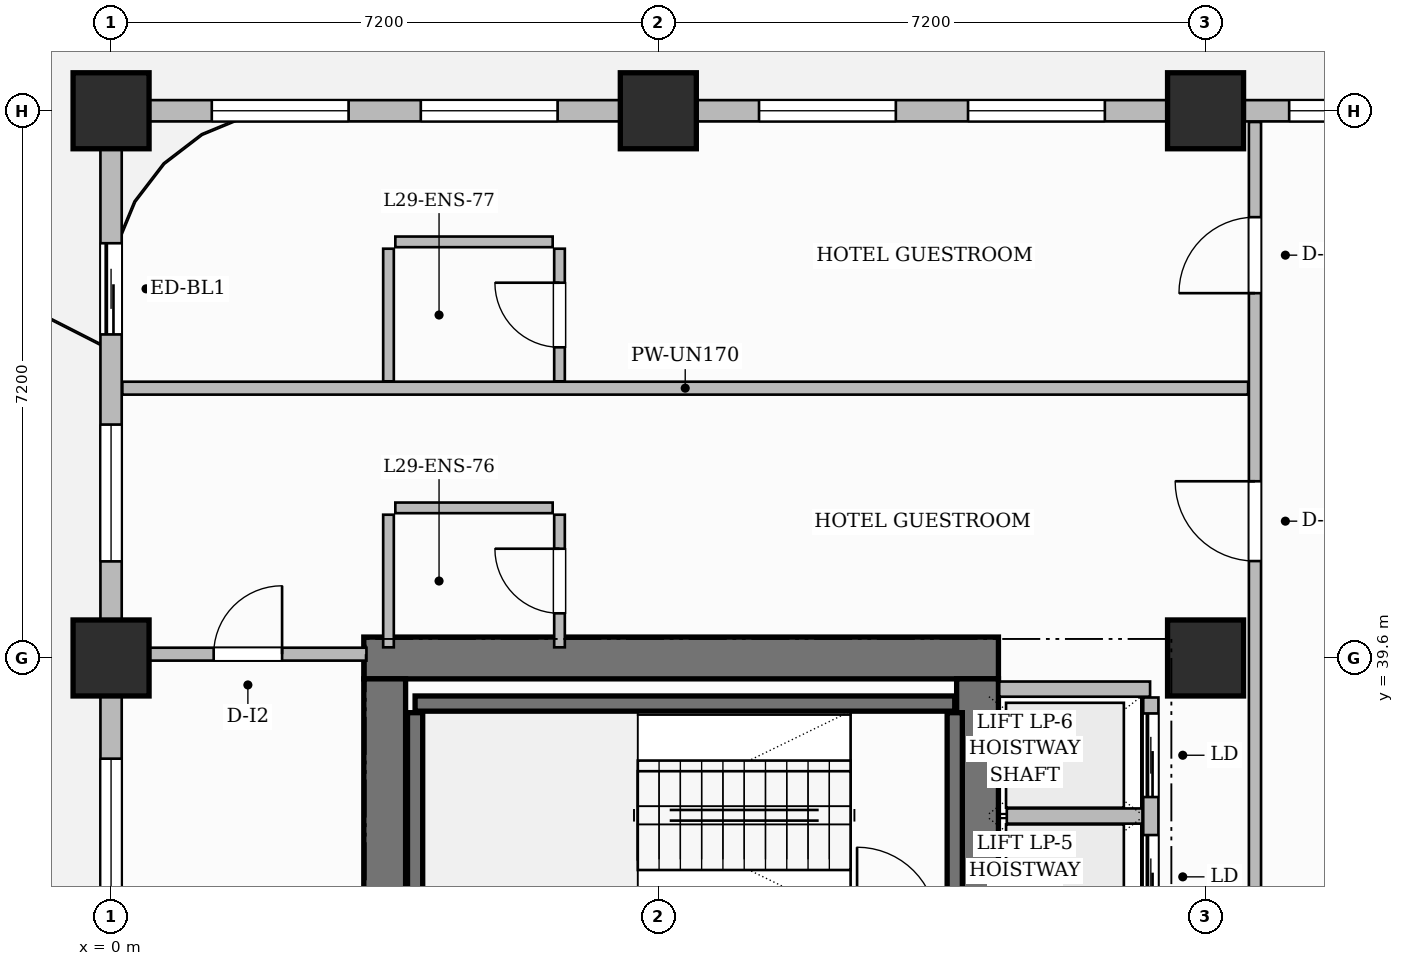
"""IFC4 building model, lengths in metres.
Left out: names, types, materials, properties, quantities, classifications, styles, units other than length and angle.
Written with IfcOpenShell. Run it as: python <this file> out.ifc"""

import sys

from ifc_helpers import new_model, si_unit, direction, frame, frame_2d, origin, origin_2d, place, context, subcontext, project, spatial, rectangle, extrude, source, transform, mapped, element, fill, save


model = new_model("IFC4")
c1 = context("Model", 3, precision=1e-05, world=origin(), true_north=direction((0.0, 1.0)))
c2 = subcontext(c1, "Body", "Model", "MODEL_VIEW")
j1 = project(units=[si_unit("LENGTHUNIT", "METRE"), si_unit("PLANEANGLEUNIT", "RADIAN")], contexts=[c1])
p1 = place(None, origin())
s1 = spatial("IfcSite", under=j1, at=p1, CompositionType="ELEMENT")
p2 = place(p1, origin())
s2 = spatial("IfcBuilding", under=s1, at=p2, CompositionType="ELEMENT")
p3 = place(p2, frame((0.0, 0.0, 119.2)))
s3 = spatial("IfcBuildingStorey", under=s2, at=p3, CompositionType="ELEMENT", Elevation=119.2)
p4 = place(p3, frame((3.325, 39.6, 0.0), z_axis=(0.0, 0.0, 1.0), x_axis=(1.0, 0.0, 0.0)))
e1 = element("IfcWall", 1, at=p4, inside=s3, PredefinedType="SHEAR", context=c2, shape_type="SweptSolid", body=[
    extrude(rectangle(XDim=8.35, YDim=0.55, at=frame_2d((4.175, 0.0))), origin(), (0.0, 0.0, 1.0), 3.7),
])
p5 = place(p3, frame((3.6, 25.475, 0.0), z_axis=(0.0, 0.0, 1.0), x_axis=(0.0, 1.0, 0.0)))
e2 = element("IfcWall", 2, at=p5, inside=s3, PredefinedType="SHEAR", context=c2, shape_type="SweptSolid", body=[
    extrude(rectangle(XDim=13.85, YDim=0.55, at=frame_2d((6.925, 0.0))), origin(), (0.0, 0.0, 1.0), 3.7),
])
p6 = place(p3, frame((11.4, 25.475, 0.0), z_axis=(0.0, 0.0, 1.0), x_axis=(0.0, 1.0, 0.0)))
e3 = element("IfcWall", 3, at=p6, inside=s3, PredefinedType="SHEAR", context=c2, shape_type="SweptSolid", body=[
    extrude(rectangle(XDim=13.85, YDim=0.55, at=frame_2d((6.925, 0.0))), origin(), (0.0, 0.0, 1.0), 3.7),
])
p7 = place(p6, frame((6.495, 0.0, 0.0)))
e4 = element("IfcOpeningElement", 4, at=p7, cuts=e3, PredefinedType="OPENING", context=c2, shape_type="SweptSolid", body=[
    extrude(rectangle(XDim=1.5, YDim=2.2, at=frame_2d((0.75, 1.1))), frame((0.0, 0.285, 0.0), z_axis=(0.0, -1.0, 0.0), x_axis=(1.0, 0.0, 0.0)), (0.0, 0.0, 1.0), 0.57),
])
m1 = source(origin(), c2, "Body", "SweptSolid", [
    extrude(rectangle(XDim=1.0, YDim=1.0, at=origin_2d()), origin(), (0.0, 0.0, 1.0), 3.7),
])
for number, where, z_axis, x_axis in (
    (5, (0.0, 39.6, 0.0), (0.0, 0.0, 1.0), (1.0, 0.0, 0.0)),
    (6, (0.0, 46.8, 0.0), (0.0, 0.0, 1.0), (1.0, 0.0, 0.0)),
    (7, (7.2, 46.8, 0.0), (0.0, 0.0, 1.0), (1.0, 0.0, 0.0)),
    (8, (14.4, 39.6, 0.0), (0.0, 0.0, 1.0), (1.0, 0.0, 0.0)),
    (9, (14.4, 46.8, 0.0), (0.0, 0.0, 1.0), (1.0, 0.0, 0.0)),
):
    element("IfcColumn", number, at=place(p3, frame(where, z_axis=z_axis, x_axis=x_axis)), inside=s3, PredefinedType="COLUMN", context=c2, shape_type="MappedRepresentation", body=[
        mapped(m1, transform((0.0, 0.0, 0.0), scale=1.0)),
    ])
p8 = place(p3, frame((4.0, 39.0, 0.0), z_axis=(0.0, 0.0, 1.0), x_axis=(1.0, 0.0, 0.0)))
e10 = element("IfcWall", 10, at=p8, inside=s3, PredefinedType="SHEAR", context=c2, shape_type="SweptSolid", body=[
    extrude(rectangle(XDim=7.1, YDim=0.2, at=frame_2d((3.55, 0.0))), origin(), (0.0, 0.0, 1.0), 3.7),
])
for number, where, z_axis, x_axis in (
    (11, (4.0, 36.18, 0.0), (0.0, 0.0, 1.0), (0.0, 1.0, 0.0)),
    (12, (11.1, 36.18, 0.0), (0.0, 0.0, 1.0), (0.0, 1.0, 0.0)),
):
    element("IfcWall", number, at=place(p3, frame(where, z_axis=z_axis, x_axis=x_axis)), inside=s3, PredefinedType="SHEAR", context=c2, shape_type="SweptSolid", body=[
        extrude(rectangle(XDim=2.7, YDim=0.2, at=frame_2d((1.35, 0.0))), origin(), (0.0, 0.0, 1.0), 3.7),
    ])
p9 = place(p3, frame((11.685, 39.19, 0.0), z_axis=(0.0, 0.0, 1.0), x_axis=(1.0, 0.0, 0.0)))
e13 = element("IfcWall", 13, at=p9, inside=s3, PredefinedType="PARTITIONING", context=c2, shape_type="SweptSolid", body=[
    extrude(rectangle(XDim=1.985, YDim=0.2, at=frame_2d((0.992, 0.0))), origin(), (0.0, 0.0, 1.0), 3.45),
])
p10 = place(p3, frame((13.68, 34.36, 0.0), z_axis=(0.0, 0.0, 1.0), x_axis=(0.0, 1.0, 0.0)))
e14 = element("IfcWall", 14, at=p10, inside=s3, PredefinedType="PARTITIONING", context=c2, shape_type="SweptSolid", body=[
    extrude(rectangle(XDim=4.72, YDim=0.2, at=frame_2d((2.36, 0.0))), origin(), (0.0, 0.0, 1.0), 3.45),
])
p11 = place(p10, frame((0.21, 0.0, 0.0)))
e15 = element("IfcOpeningElement", 15, at=p11, cuts=e14, PredefinedType="OPENING", context=c2, shape_type="SweptSolid", body=[
    extrude(rectangle(XDim=1.1, YDim=2.2, at=frame_2d((0.55, 1.1))), frame((0.0, 0.11, 0.0), z_axis=(0.0, -1.0, 0.0), x_axis=(1.0, 0.0, 0.0)), (0.0, 0.0, 1.0), 0.22),
])
p12 = place(p10, frame((1.81, 0.0, 0.0)))
e16 = element("IfcOpeningElement", 16, at=p12, cuts=e14, PredefinedType="OPENING", context=c2, shape_type="SweptSolid", body=[
    extrude(rectangle(XDim=1.1, YDim=2.2, at=frame_2d((0.55, 1.1))), frame((0.0, 0.11, 0.0), z_axis=(0.0, -1.0, 0.0), x_axis=(1.0, 0.0, 0.0)), (0.0, 0.0, 1.0), 0.22),
])
p13 = place(p10, frame((3.41, 0.0, 0.0)))
e17 = element("IfcOpeningElement", 17, at=p13, cuts=e14, PredefinedType="OPENING", context=c2, shape_type="SweptSolid", body=[
    extrude(rectangle(XDim=1.1, YDim=2.2, at=frame_2d((0.55, 1.1))), frame((0.0, 0.11, 0.0), z_axis=(0.0, -1.0, 0.0), x_axis=(1.0, 0.0, 0.0)), (0.0, 0.0, 1.0), 0.22),
])
p14 = place(p3, frame((11.785, 37.52, 0.0), z_axis=(0.0, 0.0, 1.0), x_axis=(1.0, 0.0, 0.0)))
e18 = element("IfcWall", 18, at=p14, inside=s3, PredefinedType="PARTITIONING", context=c2, shape_type="SweptSolid", body=[
    extrude(rectangle(XDim=1.785, YDim=0.2, at=frame_2d((0.893, 0.0))), origin(), (0.0, 0.0, 1.0), 3.45),
])
p15 = place(p3, frame((0.24, 39.65, 0.0), z_axis=(0.0, 0.0, 1.0), x_axis=(1.0, 0.0, 0.0)))
e19 = element("IfcWall", 19, at=p15, inside=s3, PredefinedType="PARTITIONING", context=c2, shape_type="SweptSolid", body=[
    extrude(rectangle(XDim=3.12, YDim=0.17, at=frame_2d((1.56, 0.0))), origin(), (0.0, 0.0, 1.0), 3.45),
])
p16 = place(p15, frame((1.11, 0.0, 0.0)))
e20 = element("IfcOpeningElement", 20, at=p16, cuts=e19, PredefinedType="OPENING", context=c2, shape_type="SweptSolid", body=[
    extrude(rectangle(XDim=0.9, YDim=2.15, at=frame_2d((0.45, 1.075))), frame((0.0, 0.095, 0.0), z_axis=(0.0, -1.0, 0.0), x_axis=(1.0, 0.0, 0.0)), (0.0, 0.0, 1.0), 0.19),
])
p17 = place(p3, frame((15.05, 34.34, 0.0), z_axis=(0.0, 0.0, 1.0), x_axis=(0.0, 1.0, 0.0)))
e21 = element("IfcWall", 21, at=p17, inside=s3, PredefinedType="PARTITIONING", context=c2, shape_type="SweptSolid", body=[
    extrude(rectangle(XDim=12.312, YDim=0.16, at=frame_2d((6.156, 0.0))), origin(), (0.0, 0.0, 1.0), 3.45),
])
p18 = place(p17, frame((6.535, 0.0, 0.0)))
e22 = element("IfcOpeningElement", 22, at=p18, cuts=e21, PredefinedType="OPENING", context=c2, shape_type="SweptSolid", body=[
    extrude(rectangle(XDim=1.05, YDim=2.25, at=frame_2d((0.525, 1.125))), frame((0.0, 0.09, 0.0), z_axis=(0.0, -1.0, 0.0), x_axis=(1.0, 0.0, 0.0)), (0.0, 0.0, 1.0), 0.18),
])
p19 = place(p17, frame((10.06, 0.0, 0.0)))
e23 = element("IfcOpeningElement", 23, at=p19, cuts=e21, PredefinedType="OPENING", context=c2, shape_type="SweptSolid", body=[
    extrude(rectangle(XDim=1.0, YDim=2.2, at=frame_2d((0.5, 1.1))), frame((0.0, 0.09, 0.0), z_axis=(0.0, -1.0, 0.0), x_axis=(1.0, 0.0, 0.0)), (0.0, 0.0, 1.0), 0.18),
])
p20 = place(p3, frame((0.148, 43.15, 0.0), z_axis=(0.0, 0.0, 1.0), x_axis=(1.0, 0.0, 0.0)))
e24 = element("IfcWall", 24, at=p20, inside=s3, PredefinedType="PARTITIONING", context=c2, shape_type="SweptSolid", body=[
    extrude(rectangle(XDim=14.812, YDim=0.17, at=frame_2d((7.406, 0.0))), origin(), (0.0, 0.0, 1.0), 3.45),
])
p21 = place(p3, frame((3.65, 39.74, 0.0), z_axis=(0.0, 0.0, 1.0), x_axis=(0.0, 1.0, 0.0)))
e25 = element("IfcWall", 25, at=p21, inside=s3, PredefinedType="PARTITIONING", context=c2, shape_type="SweptSolid", body=[
    extrude(rectangle(XDim=1.745, YDim=0.14, at=frame_2d((0.873, 0.0))), origin(), (0.0, 0.0, 1.0), 3.45),
])
p22 = place(p3, frame((3.74, 41.575, 0.0), z_axis=(0.0, 0.0, 1.0), x_axis=(1.0, 0.0, 0.0)))
e26 = element("IfcWall", 26, at=p22, inside=s3, PredefinedType="PARTITIONING", context=c2, shape_type="SweptSolid", body=[
    extrude(rectangle(XDim=2.07, YDim=0.14, at=frame_2d((1.035, 0.0))), origin(), (0.0, 0.0, 1.0), 2.935),
])
p23 = place(p3, frame((5.9, 39.74, 0.0), z_axis=(0.0, 0.0, 1.0), x_axis=(0.0, 1.0, 0.0)))
e27 = element("IfcWall", 27, at=p23, inside=s3, PredefinedType="PARTITIONING", context=c2, shape_type="SweptSolid", body=[
    extrude(rectangle(XDim=1.745, YDim=0.14, at=frame_2d((0.873, 0.0))), origin(), (0.0, 0.0, 1.0), 3.45),
])
p24 = place(p23, frame((0.448, 0.0, 0.0)))
e28 = element("IfcOpeningElement", 28, at=p24, cuts=e27, PredefinedType="OPENING", context=c2, shape_type="SweptSolid", body=[
    extrude(rectangle(XDim=0.85, YDim=2.1, at=frame_2d((0.425, 1.05))), frame((0.0, 0.08, 0.0), z_axis=(0.0, -1.0, 0.0), x_axis=(1.0, 0.0, 0.0)), (0.0, 0.0, 1.0), 0.16),
])
p25 = place(p3, frame((3.65, 43.24, 0.0), z_axis=(0.0, 0.0, 1.0), x_axis=(0.0, 1.0, 0.0)))
e29 = element("IfcWall", 29, at=p25, inside=s3, PredefinedType="PARTITIONING", context=c2, shape_type="SweptSolid", body=[
    extrude(rectangle(XDim=1.745, YDim=0.14, at=frame_2d((0.873, 0.0))), origin(), (0.0, 0.0, 1.0), 3.45),
])
p26 = place(p3, frame((3.74, 45.075, 0.0), z_axis=(0.0, 0.0, 1.0), x_axis=(1.0, 0.0, 0.0)))
e30 = element("IfcWall", 30, at=p26, inside=s3, PredefinedType="PARTITIONING", context=c2, shape_type="SweptSolid", body=[
    extrude(rectangle(XDim=2.07, YDim=0.14, at=frame_2d((1.035, 0.0))), origin(), (0.0, 0.0, 1.0), 3.45),
])
p27 = place(p3, frame((5.9, 43.24, 0.0), z_axis=(0.0, 0.0, 1.0), x_axis=(0.0, 1.0, 0.0)))
e31 = element("IfcWall", 31, at=p27, inside=s3, PredefinedType="PARTITIONING", context=c2, shape_type="SweptSolid", body=[
    extrude(rectangle(XDim=1.745, YDim=0.14, at=frame_2d((0.873, 0.0))), origin(), (0.0, 0.0, 1.0), 3.45),
])
p28 = place(p27, frame((0.448, 0.0, 0.0)))
e32 = element("IfcOpeningElement", 32, at=p28, cuts=e31, PredefinedType="OPENING", context=c2, shape_type="SweptSolid", body=[
    extrude(rectangle(XDim=0.85, YDim=2.1, at=frame_2d((0.425, 1.05))), frame((0.0, 0.08, 0.0), z_axis=(0.0, -1.0, 0.0), x_axis=(1.0, 0.0, 0.0)), (0.0, 0.0, 1.0), 0.16),
])
p29 = place(p3, frame((0.0, 25.25, 0.0), z_axis=(0.0, 0.0, 1.0), x_axis=(0.0, 1.0, 0.0)))
e33 = element("IfcWall", 33, at=p29, inside=s3, PredefinedType="SOLIDWALL", context=c2, shape_type="SweptSolid", body=[
    extrude(rectangle(XDim=21.5, YDim=0.28, at=frame_2d((10.75, 0.0))), origin(), (0.0, 0.0, 1.0), 2.935),
])
p30 = place(p29, frame((18.607, 0.0, 0.0)))
e34 = element("IfcOpeningElement", 34, at=p30, cuts=e33, PredefinedType="OPENING", context=c2, shape_type="SweptSolid", body=[
    extrude(rectangle(XDim=1.2, YDim=2.2, at=frame_2d((0.6, 1.1))), frame((0.0, 0.15, 0.0), z_axis=(0.0, -1.0, 0.0), x_axis=(1.0, 0.0, 0.0)), (0.0, 0.0, 1.0), 0.3),
])
p31 = place(p29, frame((0.8, 0.0, 0.0)))
e35 = element("IfcOpeningElement", 35, at=p31, cuts=e33, PredefinedType="OPENING", context=c2, shape_type="SweptSolid", body=[
    extrude(rectangle(XDim=1.2, YDim=2.2, at=frame_2d((0.6, 1.1))), frame((0.0, 0.15, 0.0), z_axis=(0.0, -1.0, 0.0), x_axis=(1.0, 0.0, 0.0)), (0.0, 0.0, 1.0), 0.3),
])
p32 = place(p29, frame((3.425, 0.0, 0.8)))
e36 = element("IfcOpeningElement", 36, at=p32, cuts=e33, PredefinedType="OPENING", context=c2, shape_type="SweptSolid", body=[
    extrude(rectangle(XDim=1.8, YDim=1.85, at=frame_2d((0.9, 0.925))), frame((0.0, 0.15, 0.0), z_axis=(0.0, -1.0, 0.0), x_axis=(1.0, 0.0, 0.0)), (0.0, 0.0, 1.0), 0.3),
])
p33 = place(p29, frame((8.475, 0.0, 0.8)))
e37 = element("IfcOpeningElement", 37, at=p33, cuts=e33, PredefinedType="OPENING", context=c2, shape_type="SweptSolid", body=[
    extrude(rectangle(XDim=1.8, YDim=1.85, at=frame_2d((0.9, 0.925))), frame((0.0, 0.15, 0.0), z_axis=(0.0, -1.0, 0.0), x_axis=(1.0, 0.0, 0.0)), (0.0, 0.0, 1.0), 0.3),
])
p34 = place(p29, frame((11.225, 0.0, 0.8)))
e38 = element("IfcOpeningElement", 38, at=p34, cuts=e33, PredefinedType="OPENING", context=c2, shape_type="SweptSolid", body=[
    extrude(rectangle(XDim=1.8, YDim=1.85, at=frame_2d((0.9, 0.925))), frame((0.0, 0.15, 0.0), z_axis=(0.0, -1.0, 0.0), x_axis=(1.0, 0.0, 0.0)), (0.0, 0.0, 1.0), 0.3),
])
p35 = place(p29, frame((15.621, 0.0, 0.8)))
e39 = element("IfcOpeningElement", 39, at=p35, cuts=e33, PredefinedType="OPENING", context=c2, shape_type="SweptSolid", body=[
    extrude(rectangle(XDim=1.8, YDim=1.85, at=frame_2d((0.9, 0.925))), frame((0.0, 0.15, 0.0), z_axis=(0.0, -1.0, 0.0), x_axis=(1.0, 0.0, 0.0)), (0.0, 0.0, 1.0), 0.3),
])
p36 = place(p3, frame((0.0, 46.8, 0.0), z_axis=(0.0, 0.0, 1.0), x_axis=(1.0, 0.0, 0.0)))
e40 = element("IfcWall", 40, at=p36, inside=s3, PredefinedType="SOLIDWALL", context=c2, shape_type="SweptSolid", body=[
    extrude(rectangle(XDim=18.0, YDim=0.28, at=frame_2d((9.0, 0.0))), origin(), (0.0, 0.0, 1.0), 2.935),
])
p37 = place(p36, frame((1.325, 0.0, 0.8)))
e41 = element("IfcOpeningElement", 41, at=p37, cuts=e40, PredefinedType="OPENING", context=c2, shape_type="SweptSolid", body=[
    extrude(rectangle(XDim=1.8, YDim=1.85, at=frame_2d((0.9, 0.925))), frame((0.0, 0.15, 0.0), z_axis=(0.0, -1.0, 0.0), x_axis=(1.0, 0.0, 0.0)), (0.0, 0.0, 1.0), 0.3),
])
p38 = place(p36, frame((4.075, 0.0, 0.8)))
e42 = element("IfcOpeningElement", 42, at=p38, cuts=e40, PredefinedType="OPENING", context=c2, shape_type="SweptSolid", body=[
    extrude(rectangle(XDim=1.8, YDim=1.85, at=frame_2d((0.9, 0.925))), frame((0.0, 0.15, 0.0), z_axis=(0.0, -1.0, 0.0), x_axis=(1.0, 0.0, 0.0)), (0.0, 0.0, 1.0), 0.3),
])
p39 = place(p36, frame((8.525, 0.0, 0.8)))
e43 = element("IfcOpeningElement", 43, at=p39, cuts=e40, PredefinedType="OPENING", context=c2, shape_type="SweptSolid", body=[
    extrude(rectangle(XDim=1.8, YDim=1.85, at=frame_2d((0.9, 0.925))), frame((0.0, 0.15, 0.0), z_axis=(0.0, -1.0, 0.0), x_axis=(1.0, 0.0, 0.0)), (0.0, 0.0, 1.0), 0.3),
])
p40 = place(p36, frame((11.275, 0.0, 0.8)))
e44 = element("IfcOpeningElement", 44, at=p40, cuts=e40, PredefinedType="OPENING", context=c2, shape_type="SweptSolid", body=[
    extrude(rectangle(XDim=1.8, YDim=1.85, at=frame_2d((0.9, 0.925))), frame((0.0, 0.15, 0.0), z_axis=(0.0, -1.0, 0.0), x_axis=(1.0, 0.0, 0.0)), (0.0, 0.0, 1.0), 0.3),
])
p41 = place(p36, frame((15.5, 0.0, 0.8)))
e45 = element("IfcOpeningElement", 45, at=p41, cuts=e40, PredefinedType="OPENING", context=c2, shape_type="SweptSolid", body=[
    extrude(rectangle(XDim=1.4, YDim=1.85, at=frame_2d((0.7, 0.925))), frame((0.0, 0.15, 0.0), z_axis=(0.0, -1.0, 0.0), x_axis=(1.0, 0.0, 0.0)), (0.0, 0.0, 1.0), 0.3),
])
m2 = source(origin(), c2, "Body", "SweptSolid", [
    extrude(rectangle(XDim=0.9, YDim=2.15, at=frame_2d((0.45, 1.075))), frame((0.0, 0.025, 0.0), z_axis=(0.0, -1.0, 0.0), x_axis=(1.0, 0.0, 0.0)), (0.0, 0.0, 1.0), 0.05),
])
p42 = place(p16, origin())
e46 = element("IfcDoor", 46, at=p42, inside=s3, OperationType="SINGLE_SWING_RIGHT", PredefinedType="DOOR", context=c2, shape_type="MappedRepresentation", body=[
    mapped(m2, transform((0.0, 0.0, 0.0), scale=1.0)),
])
fill(e20, e46)
m3 = source(origin(), c2, "Body", "SweptSolid", [
    extrude(rectangle(XDim=0.85, YDim=2.1, at=frame_2d((0.425, 1.05))), frame((0.0, 0.025, 0.0), z_axis=(0.0, -1.0, 0.0), x_axis=(1.0, 0.0, 0.0)), (0.0, 0.0, 1.0), 0.05),
])
p43 = place(p24, origin())
e47 = element("IfcDoor", 47, at=p43, inside=s3, OperationType="SINGLE_SWING_RIGHT", PredefinedType="DOOR", context=c2, shape_type="MappedRepresentation", body=[
    mapped(m3, transform((0.0, 0.0, 0.0), scale=1.0)),
])
fill(e28, e47)
m4 = source(origin(), c2, "Body", "SweptSolid", [
    extrude(rectangle(XDim=1.05, YDim=2.25, at=frame_2d((0.525, 1.125))), frame((0.0, 0.025, 0.0), z_axis=(0.0, -1.0, 0.0), x_axis=(1.0, 0.0, 0.0)), (0.0, 0.0, 1.0), 0.05),
])
p44 = place(p18, origin())
e48 = element("IfcDoor", 48, at=p44, inside=s3, OperationType="SINGLE_SWING_RIGHT", PredefinedType="DOOR", context=c2, shape_type="MappedRepresentation", body=[
    mapped(m4, transform((0.0, 0.0, 0.0), scale=1.0)),
])
fill(e22, e48)
p45 = place(p28, origin())
e49 = element("IfcDoor", 49, at=p45, inside=s3, OperationType="SINGLE_SWING_RIGHT", PredefinedType="DOOR", context=c2, shape_type="MappedRepresentation", body=[
    mapped(m3, transform((0.0, 0.0, 0.0), scale=1.0)),
])
fill(e32, e49)
m5 = source(origin(), c2, "Body", "SweptSolid", [
    extrude(rectangle(XDim=1.0, YDim=2.2, at=frame_2d((0.5, 1.1))), frame((0.0, 0.025, 0.0), z_axis=(0.0, -1.0, 0.0), x_axis=(1.0, 0.0, 0.0)), (0.0, 0.0, 1.0), 0.05),
])
p46 = place(p19, origin())
e50 = element("IfcDoor", 50, at=p46, inside=s3, OperationType="SINGLE_SWING_LEFT", PredefinedType="DOOR", context=c2, shape_type="MappedRepresentation", body=[
    mapped(m5, transform((0.0, 0.0, 0.0), scale=1.0)),
])
fill(e23, e50)
m6 = source(origin(), c2, "Body", "SweptSolid", [
    extrude(rectangle(XDim=1.1, YDim=2.2, at=frame_2d((0.55, 1.1))), frame((0.0, 0.025, 0.0), z_axis=(0.0, -1.0, 0.0), x_axis=(1.0, 0.0, 0.0)), (0.0, 0.0, 1.0), 0.05),
])
p47 = place(p12, origin())
e51 = element("IfcDoor", 51, at=p47, inside=s3, OperationType="SLIDING_TO_LEFT", PredefinedType="DOOR", context=c2, shape_type="MappedRepresentation", body=[
    mapped(m6, transform((0.0, 0.0, 0.0), scale=1.0)),
])
fill(e16, e51)
p48 = place(p13, origin())
e52 = element("IfcDoor", 52, at=p48, inside=s3, OperationType="SLIDING_TO_LEFT", PredefinedType="DOOR", context=c2, shape_type="MappedRepresentation", body=[
    mapped(m6, transform((0.0, 0.0, 0.0), scale=1.0)),
])
fill(e17, e52)
m7 = source(origin(), c2, "Body", "SweptSolid", [
    extrude(rectangle(XDim=1.2, YDim=2.2, at=frame_2d((0.6, 1.1))), frame((0.0, 0.025, 0.0), z_axis=(0.0, -1.0, 0.0), x_axis=(1.0, 0.0, 0.0)), (0.0, 0.0, 1.0), 0.05),
])
p49 = place(p30, origin())
e53 = element("IfcDoor", 53, at=p49, inside=s3, OperationType="SLIDING_TO_LEFT", PredefinedType="DOOR", context=c2, shape_type="MappedRepresentation", body=[
    mapped(m7, transform((0.0, 0.0, 0.0), scale=1.0)),
])
fill(e34, e53)
m8 = source(origin(), c2, "Body", "SweptSolid", [
    extrude(rectangle(XDim=1.8, YDim=1.85, at=frame_2d((0.9, 0.925))), frame((0.0, 0.03, 0.0), z_axis=(0.0, -1.0, 0.0), x_axis=(1.0, 0.0, 0.0)), (0.0, 0.0, 1.0), 0.06),
])
p50 = place(p34, origin())
e54 = element("IfcWindow", 54, at=p50, inside=s3, PartitioningType="DOUBLE_PANEL_VERTICAL", PredefinedType="WINDOW", context=c2, shape_type="MappedRepresentation", body=[
    mapped(m8, transform((0.0, 0.0, 0.0), scale=1.0)),
])
fill(e38, e54)
p51 = place(p35, origin())
e55 = element("IfcWindow", 55, at=p51, inside=s3, PartitioningType="DOUBLE_PANEL_VERTICAL", PredefinedType="WINDOW", context=c2, shape_type="MappedRepresentation", body=[
    mapped(m8, transform((0.0, 0.0, 0.0), scale=1.0)),
])
fill(e39, e55)
p52 = place(p37, origin())
e56 = element("IfcWindow", 56, at=p52, inside=s3, PartitioningType="DOUBLE_PANEL_VERTICAL", PredefinedType="WINDOW", context=c2, shape_type="MappedRepresentation", body=[
    mapped(m8, transform((0.0, 0.0, 0.0), scale=1.0)),
])
fill(e41, e56)
p53 = place(p38, origin())
e57 = element("IfcWindow", 57, at=p53, inside=s3, PartitioningType="DOUBLE_PANEL_VERTICAL", PredefinedType="WINDOW", context=c2, shape_type="MappedRepresentation", body=[
    mapped(m8, transform((0.0, 0.0, 0.0), scale=1.0)),
])
fill(e42, e57)
p54 = place(p39, origin())
e58 = element("IfcWindow", 58, at=p54, inside=s3, PartitioningType="DOUBLE_PANEL_VERTICAL", PredefinedType="WINDOW", context=c2, shape_type="MappedRepresentation", body=[
    mapped(m8, transform((0.0, 0.0, 0.0), scale=1.0)),
])
fill(e43, e58)
p55 = place(p40, origin())
e59 = element("IfcWindow", 59, at=p55, inside=s3, PartitioningType="DOUBLE_PANEL_VERTICAL", PredefinedType="WINDOW", context=c2, shape_type="MappedRepresentation", body=[
    mapped(m8, transform((0.0, 0.0, 0.0), scale=1.0)),
])
fill(e44, e59)
m9 = source(origin(), c2, "Body", "SweptSolid", [
    extrude(rectangle(XDim=1.4, YDim=1.85, at=frame_2d((0.7, 0.925))), frame((0.0, 0.03, 0.0), z_axis=(0.0, -1.0, 0.0), x_axis=(1.0, 0.0, 0.0)), (0.0, 0.0, 1.0), 0.06),
])
p56 = place(p41, origin())
e60 = element("IfcWindow", 60, at=p56, inside=s3, PartitioningType="SINGLE_PANEL", PredefinedType="WINDOW", context=c2, shape_type="MappedRepresentation", body=[
    mapped(m9, transform((0.0, 0.0, 0.0), scale=1.0)),
])
fill(e45, e60)
save(model, sys.argv[1])
